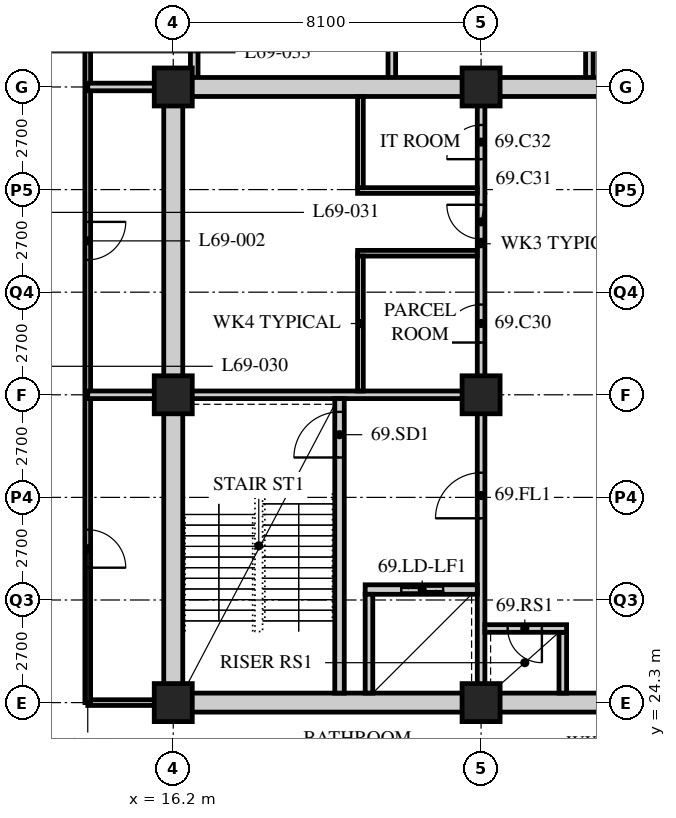
"""IFC4 building model, lengths in metres.
Left out: names, types, materials, properties, quantities, classifications, styles, units other than length and angle.
Written with IfcOpenShell. Run it as: python <this file> out.ifc"""

import sys

from ifc_helpers import new_model, si_unit, direction, frame, frame_2d, origin, origin_2d, place, context, subcontext, project, spatial, rectangle, hollow_rectangle, extrude, element, fill, save


model = new_model("IFC4")
c1 = context("Model", 3, precision=1e-05, world=origin(), true_north=direction((0.0, 1.0)))
c2 = subcontext(c1, "Body", "Model", "MODEL_VIEW")
j1 = project(units=[si_unit("LENGTHUNIT", "METRE"), si_unit("PLANEANGLEUNIT", "RADIAN")], contexts=[c1])
p1 = place(None, origin())
s1 = spatial("IfcSite", under=j1, at=p1, CompositionType="ELEMENT")
p2 = place(p1, origin())
s2 = spatial("IfcBuilding", under=s1, at=p2, CompositionType="ELEMENT")
p3 = place(p2, frame((0.0, 0.0, 269.7)))
s3 = spatial("IfcBuildingStorey", under=s2, at=p3, CompositionType="ELEMENT", Elevation=269.7)
for number, where, z_axis, x_axis in (
    (1, (16.2, 24.3, 0.0), (0.0, 0.0, 1.0), (1.0, 0.0, 0.0)),
    (2, (16.2, 32.4, 0.0), (0.0, 0.0, 1.0), (1.0, 0.0, 0.0)),
    (3, (16.2, 40.5, 0.0), (0.0, 0.0, 1.0), (1.0, 0.0, 0.0)),
    (4, (24.3, 24.3, 0.0), (0.0, 0.0, 1.0), (1.0, 0.0, 0.0)),
    (5, (24.3, 32.4, 0.0), (0.0, 0.0, 1.0), (1.0, 0.0, 0.0)),
    (6, (24.3, 40.5, 0.0), (0.0, 0.0, 1.0), (1.0, 0.0, 0.0)),
):
    element("IfcColumn", number, at=place(p3, frame(where, z_axis=z_axis, x_axis=x_axis)), inside=s3, PredefinedType="COLUMN", context=c2, shape_type="SweptSolid", body=[
        extrude(hollow_rectangle(XDim=1.0, YDim=1.0, WallThickness=0.1, at=origin_2d()), origin(), (0.0, 0.0, 1.0), 3.9),
    ])
p4 = place(p3, frame((16.0, 24.3, 0.0), z_axis=(0.0, 0.0, 1.0), x_axis=(-1.0, 0.0, 0.0)))
e7 = element("IfcWall", 7, at=p4, inside=s3, PredefinedType="PARTITIONING", context=c2, shape_type="SweptSolid", body=[
    extrude(rectangle(XDim=2.05, YDim=0.15, at=frame_2d((1.025, 0.0))), origin(), (0.0, 0.0, 1.0), 3.078),
])
p5 = place(p3, frame((13.95, 24.3, 0.0), z_axis=(0.0, 0.0, 1.0), x_axis=(0.0, 1.0, 0.0)))
e8 = element("IfcWall", 8, at=p5, inside=s3, PredefinedType="PARTITIONING", context=c2, shape_type="SweptSolid", body=[
    extrude(rectangle(XDim=26.55, YDim=0.15, at=frame_2d((13.275, 0.0))), origin(), (0.0, 0.0, 1.0), 3.69),
])
p6 = place(p5, frame((3.55, 0.0, 0.0)))
e9 = element("IfcOpeningElement", 9, at=p6, cuts=e8, PredefinedType="OPENING", context=c2, shape_type="SweptSolid", body=[
    extrude(rectangle(XDim=1.0, YDim=2.1, at=frame_2d((0.5, 1.05))), frame((0.0, 0.085, 0.0), z_axis=(0.0, -1.0, 0.0), x_axis=(1.0, 0.0, 0.0)), (0.0, 0.0, 1.0), 0.17),
])
p7 = place(p5, frame((11.65, 0.0, 0.0)))
e10 = element("IfcOpeningElement", 10, at=p7, cuts=e8, PredefinedType="OPENING", context=c2, shape_type="SweptSolid", body=[
    extrude(rectangle(XDim=1.0, YDim=2.1, at=frame_2d((0.5, 1.05))), frame((0.0, 0.085, 0.0), z_axis=(0.0, -1.0, 0.0), x_axis=(1.0, 0.0, 0.0)), (0.0, 0.0, 1.0), 0.17),
])
p8 = place(p3, frame((13.95, 32.4, 0.0), z_axis=(0.0, 0.0, 1.0), x_axis=(1.0, 0.0, 0.0)))
e11 = element("IfcWall", 11, at=p8, inside=s3, PredefinedType="SOLIDWALL", context=c2, shape_type="SweptSolid", body=[
    extrude(rectangle(XDim=2.25, YDim=0.2, at=frame_2d((1.125, 0.0))), origin(), (0.0, 0.0, 1.0), 3.078),
])
for number, where, z_axis, x_axis in (
    (12, (16.752, 50.85, 0.0), (0.0, 0.0, 1.0), (0.0, -1.0, 0.0)),
    (13, (21.951, 50.85, 0.0), (0.0, 0.0, 1.0), (0.0, -1.0, 0.0)),
    (14, (27.15, 40.5, 0.0), (0.0, 0.0, 1.0), (0.0, 1.0, 0.0)),
):
    element("IfcWall", number, at=place(p3, frame(where, z_axis=z_axis, x_axis=x_axis)), inside=s3, PredefinedType="SOLIDWALL", context=c2, shape_type="SweptSolid", body=[
        extrude(rectangle(XDim=10.35, YDim=0.2, at=frame_2d((5.175, 0.0))), origin(), (0.0, 0.0, 1.0), 3.69),
    ])
p9 = place(p3, frame((13.95, 40.5, 0.0), z_axis=(0.0, 0.0, 1.0), x_axis=(1.0, 0.0, 0.0)))
e15 = element("IfcWall", 15, at=p9, inside=s3, PredefinedType="SOLIDWALL", context=c2, shape_type="SweptSolid", body=[
    extrude(rectangle(XDim=2.25, YDim=0.2, at=frame_2d((1.125, 0.0))), origin(), (0.0, 0.0, 1.0), 3.078),
])
p10 = place(p3, frame((15.95, 24.3, 0.0), z_axis=(0.0, 0.0, 1.0), x_axis=(1.0, 0.0, 0.0)))
e16 = element("IfcWall", 16, at=p10, inside=s3, PredefinedType="SOLIDWALL", context=c2, shape_type="SweptSolid", body=[
    extrude(rectangle(XDim=24.55, YDim=0.5, at=frame_2d((12.275, 0.0))), origin(), (0.0, 0.0, 1.0), 3.04),
])
p11 = place(p10, frame((11.5, 0.0, 0.0)))
e17 = element("IfcOpeningElement", 17, at=p11, cuts=e16, PredefinedType="OPENING", context=c2, shape_type="SweptSolid", body=[
    extrude(rectangle(XDim=1.8, YDim=2.4, at=frame_2d((0.9, 1.2))), frame((0.0, 0.26, 0.0), z_axis=(0.0, -1.0, 0.0), x_axis=(1.0, 0.0, 0.0)), (0.0, 0.0, 1.0), 0.52),
])
p12 = place(p3, frame((15.95, 40.5, 0.0), z_axis=(0.0, 0.0, 1.0), x_axis=(1.0, 0.0, 0.0)))
e18 = element("IfcWall", 18, at=p12, inside=s3, PredefinedType="SOLIDWALL", context=c2, shape_type="SweptSolid", body=[
    extrude(rectangle(XDim=24.55, YDim=0.5, at=frame_2d((12.275, 0.0))), origin(), (0.0, 0.0, 1.0), 3.04),
])
p13 = place(p12, frame((11.5, 0.0, 0.0)))
e19 = element("IfcOpeningElement", 19, at=p13, cuts=e18, PredefinedType="OPENING", context=c2, shape_type="SweptSolid", body=[
    extrude(rectangle(XDim=1.8, YDim=2.4, at=frame_2d((0.9, 1.2))), frame((0.0, 0.26, 0.0), z_axis=(0.0, -1.0, 0.0), x_axis=(1.0, 0.0, 0.0)), (0.0, 0.0, 1.0), 0.52),
])
p14 = place(p3, frame((16.2, 24.55, 0.0), z_axis=(0.0, 0.0, 1.0), x_axis=(0.0, 1.0, 0.0)))
e20 = element("IfcWall", 20, at=p14, inside=s3, PredefinedType="SOLIDWALL", context=c2, shape_type="SweptSolid", body=[
    extrude(rectangle(XDim=15.7, YDim=0.5, at=frame_2d((7.85, 0.0))), origin(), (0.0, 0.0, 1.0), 3.078),
])
p15 = place(p3, frame((16.45, 32.4, 0.0), z_axis=(0.0, 0.0, 1.0), x_axis=(1.0, 0.0, 0.0)))
e21 = element("IfcWall", 21, at=p15, inside=s3, PredefinedType="SOLIDWALL", context=c2, shape_type="SweptSolid", body=[
    extrude(rectangle(XDim=7.95, YDim=0.2, at=frame_2d((3.975, 0.0))), origin(), (0.0, 0.0, 1.0), 3.078),
])
p16 = place(p3, frame((24.3, 24.55, 0.0), z_axis=(0.0, 0.0, 1.0), x_axis=(0.0, 1.0, 0.0)))
e22 = element("IfcWall", 22, at=p16, inside=s3, PredefinedType="SOLIDWALL", context=c2, shape_type="SweptSolid", body=[
    extrude(rectangle(XDim=7.75, YDim=0.2, at=frame_2d((3.875, 0.0))), origin(), (0.0, 0.0, 1.0), 3.078),
])
p17 = place(p16, frame((4.6, 0.0, 0.0)))
e23 = element("IfcOpeningElement", 23, at=p17, cuts=e22, PredefinedType="OPENING", context=c2, shape_type="SweptSolid", body=[
    extrude(rectangle(XDim=1.2, YDim=2.1, at=frame_2d((0.6, 1.05))), frame((0.0, 0.11, 0.0), z_axis=(0.0, -1.0, 0.0), x_axis=(1.0, 0.0, 0.0)), (0.0, 0.0, 1.0), 0.22),
])
p18 = place(p3, frame((20.575, 24.55, 0.0), z_axis=(0.0, 0.0, 1.0), x_axis=(0.0, 1.0, 0.0)))
e24 = element("IfcWall", 24, at=p18, inside=s3, PredefinedType="SOLIDWALL", context=c2, shape_type="SweptSolid", body=[
    extrude(rectangle(XDim=7.75, YDim=0.25, at=frame_2d((3.875, 0.0))), origin(), (0.0, 0.0, 1.0), 3.69),
])
p19 = place(p18, frame((6.2, 0.0, 0.0)))
e25 = element("IfcOpeningElement", 25, at=p19, cuts=e24, PredefinedType="OPENING", context=c2, shape_type="SweptSolid", body=[
    extrude(rectangle(XDim=1.2, YDim=2.1, at=frame_2d((0.6, 1.05))), frame((0.0, 0.135, 0.0), z_axis=(0.0, -1.0, 0.0), x_axis=(1.0, 0.0, 0.0)), (0.0, 0.0, 1.0), 0.27),
])
p20 = place(p3, frame((21.25, 27.275, 0.0), z_axis=(0.0, 0.0, 1.0), x_axis=(1.0, 0.0, 0.0)))
e26 = element("IfcWall", 26, at=p20, inside=s3, PredefinedType="SOLIDWALL", context=c2, shape_type="SweptSolid", body=[
    extrude(rectangle(XDim=2.95, YDim=0.25, at=frame_2d((1.475, 0.0))), origin(), (0.0, 0.0, 1.0), 3.69),
])
p21 = place(p20, frame((0.95, 0.0, 0.0)))
e27 = element("IfcOpeningElement", 27, at=p21, cuts=e26, PredefinedType="OPENING", context=c2, shape_type="SweptSolid", body=[
    extrude(rectangle(XDim=1.1, YDim=2.4, at=frame_2d((0.55, 1.2))), frame((0.0, 0.135, 0.0), z_axis=(0.0, -1.0, 0.0), x_axis=(1.0, 0.0, 0.0)), (0.0, 0.0, 1.0), 0.27),
])
p22 = place(p3, frame((21.35, 24.55, 0.0), z_axis=(0.0, 0.0, 1.0), x_axis=(0.0, 1.0, 0.0)))
e28 = element("IfcWall", 28, at=p22, inside=s3, PredefinedType="SOLIDWALL", context=c2, shape_type="SweptSolid", body=[
    extrude(rectangle(XDim=2.6, YDim=0.2, at=frame_2d((1.3, 0.0))), origin(), (0.0, 0.0, 1.0), 3.69),
])
p23 = place(p3, frame((26.45, 24.55, 0.0), z_axis=(0.0, 0.0, 1.0), x_axis=(0.0, 1.0, 0.0)))
e29 = element("IfcWall", 29, at=p23, inside=s3, PredefinedType="SOLIDWALL", context=c2, shape_type="SweptSolid", body=[
    extrude(rectangle(XDim=1.6, YDim=0.2, at=frame_2d((0.8, 0.0))), origin(), (0.0, 0.0, 1.0), 3.69),
])
p24 = place(p3, frame((24.4, 26.25, 0.0), z_axis=(0.0, 0.0, 1.0), x_axis=(1.0, 0.0, 0.0)))
e30 = element("IfcWall", 30, at=p24, inside=s3, PredefinedType="SOLIDWALL", context=c2, shape_type="SweptSolid", body=[
    extrude(rectangle(XDim=2.15, YDim=0.2, at=frame_2d((1.075, 0.0))), origin(), (0.0, 0.0, 1.0), 3.69),
])
p25 = place(p24, frame((0.6, 0.0, 0.0)))
e31 = element("IfcOpeningElement", 31, at=p25, cuts=e30, PredefinedType="OPENING", context=c2, shape_type="SweptSolid", body=[
    extrude(rectangle(XDim=0.9, YDim=2.1, at=frame_2d((0.45, 1.05))), frame((0.0, 0.11, 0.0), z_axis=(0.0, -1.0, 0.0), x_axis=(1.0, 0.0, 0.0)), (0.0, 0.0, 1.0), 0.22),
])
p26 = place(p3, frame((24.3, 32.5, 0.0), z_axis=(0.0, 0.0, 1.0), x_axis=(0.0, 1.0, 0.0)))
e32 = element("IfcWall", 32, at=p26, inside=s3, PredefinedType="PARTITIONING", context=c2, shape_type="SweptSolid", body=[
    extrude(rectangle(XDim=7.75, YDim=0.2, at=frame_2d((3.875, 0.0))), origin(), (0.0, 0.0, 1.0), 3.078),
])
p27 = place(p26, frame((1.275, 0.0, 0.0)))
e33 = element("IfcOpeningElement", 33, at=p27, cuts=e32, PredefinedType="OPENING", context=c2, shape_type="SweptSolid", body=[
    extrude(rectangle(XDim=1.0, YDim=2.1, at=frame_2d((0.5, 1.05))), frame((0.0, 0.11, 0.0), z_axis=(0.0, -1.0, 0.0), x_axis=(1.0, 0.0, 0.0)), (0.0, 0.0, 1.0), 0.22),
])
p28 = place(p26, frame((4.0, 0.0, 0.0)))
e34 = element("IfcOpeningElement", 34, at=p28, cuts=e32, PredefinedType="OPENING", context=c2, shape_type="SweptSolid", body=[
    extrude(rectangle(XDim=0.9, YDim=2.1, at=frame_2d((0.45, 1.05))), frame((0.0, 0.11, 0.0), z_axis=(0.0, -1.0, 0.0), x_axis=(1.0, 0.0, 0.0)), (0.0, 0.0, 1.0), 0.22),
])
p29 = place(p26, frame((6.1, 0.0, 0.0)))
e35 = element("IfcOpeningElement", 35, at=p29, cuts=e32, PredefinedType="OPENING", context=c2, shape_type="SweptSolid", body=[
    extrude(rectangle(XDim=0.9, YDim=2.1, at=frame_2d((0.45, 1.05))), frame((0.0, 0.11, 0.0), z_axis=(0.0, -1.0, 0.0), x_axis=(1.0, 0.0, 0.0)), (0.0, 0.0, 1.0), 0.22),
])
for number, where, z_axis, x_axis in (
    (36, (21.05, 36.125, 0.0), (0.0, 0.0, 1.0), (1.0, 0.0, 0.0)),
    (37, (21.05, 37.775, 0.0), (0.0, 0.0, 1.0), (1.0, 0.0, 0.0)),
):
    element("IfcWall", number, at=place(p3, frame(where, z_axis=z_axis, x_axis=x_axis)), inside=s3, PredefinedType="PARTITIONING", context=c2, shape_type="SweptSolid", body=[
        extrude(rectangle(XDim=3.15, YDim=0.15, at=frame_2d((1.575, 0.0))), origin(), (0.0, 0.0, 1.0), 3.69),
    ])
p30 = place(p3, frame((21.125, 32.5, 0.0), z_axis=(0.0, 0.0, 1.0), x_axis=(0.0, 1.0, 0.0)))
e38 = element("IfcWall", 38, at=p30, inside=s3, PredefinedType="PARTITIONING", context=c2, shape_type="SweptSolid", body=[
    extrude(rectangle(XDim=3.55, YDim=0.15, at=frame_2d((1.775, 0.0))), origin(), (0.0, 0.0, 1.0), 3.69),
])
p31 = place(p3, frame((21.125, 37.85, 0.0), z_axis=(0.0, 0.0, 1.0), x_axis=(0.0, 1.0, 0.0)))
e39 = element("IfcWall", 39, at=p31, inside=s3, PredefinedType="PARTITIONING", context=c2, shape_type="SweptSolid", body=[
    extrude(rectangle(XDim=2.4, YDim=0.15, at=frame_2d((1.2, 0.0))), origin(), (0.0, 0.0, 1.0), 3.69),
])
p32 = place(p6, origin())
e40 = element("IfcDoor", 40, at=p32, inside=s3, OperationType="SINGLE_SWING_RIGHT", PredefinedType="DOOR", context=c2, shape_type="SweptSolid", body=[
    extrude(rectangle(XDim=1.0, YDim=2.1, at=frame_2d((0.5, 1.05))), frame((0.0, 0.025, 0.0), z_axis=(0.0, -1.0, 0.0), x_axis=(1.0, 0.0, 0.0)), (0.0, 0.0, 1.0), 0.05),
])
fill(e9, e40)
p33 = place(p7, origin())
e41 = element("IfcDoor", 41, at=p33, inside=s3, OperationType="SINGLE_SWING_LEFT", PredefinedType="DOOR", context=c2, shape_type="SweptSolid", body=[
    extrude(rectangle(XDim=1.0, YDim=2.1, at=frame_2d((0.5, 1.05))), frame((0.0, 0.025, 0.0), z_axis=(0.0, -1.0, 0.0), x_axis=(1.0, 0.0, 0.0)), (0.0, 0.0, 1.0), 0.05),
])
fill(e10, e41)
p34 = place(p27, origin())
e42 = element("IfcDoor", 42, at=p34, inside=s3, OperationType="SINGLE_SWING_LEFT", PredefinedType="DOOR", context=c2, shape_type="SweptSolid", body=[
    extrude(rectangle(XDim=1.0, YDim=2.1, at=frame_2d((0.5, 1.05))), frame((0.0, 0.025, 0.0), z_axis=(0.0, -1.0, 0.0), x_axis=(1.0, 0.0, 0.0)), (0.0, 0.0, 1.0), 0.05),
])
fill(e33, e42)
p35 = place(p28, origin())
e43 = element("IfcDoor", 43, at=p35, inside=s3, OperationType="SINGLE_SWING_RIGHT", PredefinedType="DOOR", context=c2, shape_type="SweptSolid", body=[
    extrude(rectangle(XDim=0.9, YDim=2.1, at=frame_2d((0.45, 1.05))), frame((0.0, 0.025, 0.0), z_axis=(0.0, -1.0, 0.0), x_axis=(1.0, 0.0, 0.0)), (0.0, 0.0, 1.0), 0.05),
])
fill(e34, e43)
p36 = place(p29, origin())
e44 = element("IfcDoor", 44, at=p36, inside=s3, OperationType="SINGLE_SWING_LEFT", PredefinedType="DOOR", context=c2, shape_type="SweptSolid", body=[
    extrude(rectangle(XDim=0.9, YDim=2.1, at=frame_2d((0.45, 1.05))), frame((0.0, 0.025, 0.0), z_axis=(0.0, -1.0, 0.0), x_axis=(1.0, 0.0, 0.0)), (0.0, 0.0, 1.0), 0.05),
])
fill(e35, e44)
p37 = place(p19, origin())
e45 = element("IfcDoor", 45, at=p37, inside=s3, OperationType="SINGLE_SWING_LEFT", PredefinedType="DOOR", context=c2, shape_type="SweptSolid", body=[
    extrude(rectangle(XDim=1.2, YDim=2.1, at=frame_2d((0.6, 1.05))), frame((0.0, 0.025, 0.0), z_axis=(0.0, -1.0, 0.0), x_axis=(1.0, 0.0, 0.0)), (0.0, 0.0, 1.0), 0.05),
])
fill(e25, e45)
p38 = place(p17, origin())
e46 = element("IfcDoor", 46, at=p38, inside=s3, OperationType="SINGLE_SWING_LEFT", PredefinedType="DOOR", context=c2, shape_type="SweptSolid", body=[
    extrude(rectangle(XDim=1.2, YDim=2.1, at=frame_2d((0.6, 1.05))), frame((0.0, 0.025, 0.0), z_axis=(0.0, -1.0, 0.0), x_axis=(1.0, 0.0, 0.0)), (0.0, 0.0, 1.0), 0.05),
])
fill(e23, e46)
p39 = place(p25, origin())
e47 = element("IfcDoor", 47, at=p39, inside=s3, OperationType="SINGLE_SWING_LEFT", PredefinedType="DOOR", context=c2, shape_type="SweptSolid", body=[
    extrude(rectangle(XDim=0.9, YDim=2.1, at=frame_2d((0.45, 1.05))), frame((0.0, 0.025, 0.0), z_axis=(0.0, -1.0, 0.0), x_axis=(1.0, 0.0, 0.0)), (0.0, 0.0, 1.0), 0.05),
])
fill(e31, e47)
p40 = place(p21, origin())
e48 = element("IfcDoor", 48, at=p40, inside=s3, OperationType="DOUBLE_DOOR_SLIDING", PredefinedType="DOOR", context=c2, shape_type="SweptSolid", body=[
    extrude(rectangle(XDim=1.1, YDim=2.4, at=frame_2d((0.55, 1.2))), frame((0.0, 0.025, 0.0), z_axis=(0.0, -1.0, 0.0), x_axis=(1.0, 0.0, 0.0)), (0.0, 0.0, 1.0), 0.05),
])
fill(e27, e48)
save(model, sys.argv[1])
